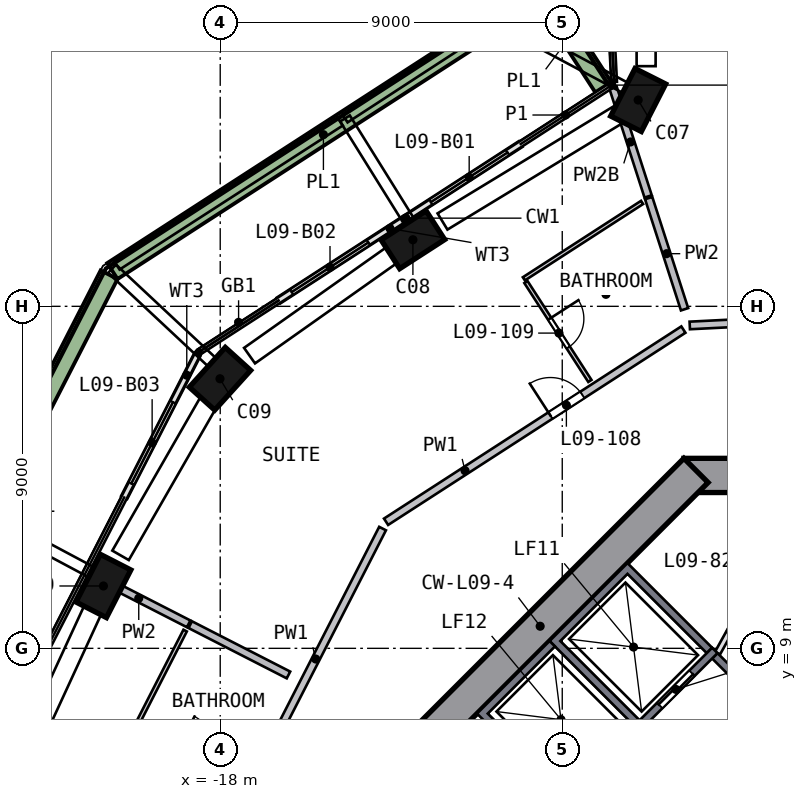
"""IFC4 building model, lengths in metres.
Left out: names, types, materials, properties, quantities, classifications, styles, units other than length and angle.
Written with IfcOpenShell. Run it as: python <this file> out.ifc"""

import sys

from ifc_helpers import new_model, si_unit, direction, frame, frame_2d, origin, origin_2d, place, context, subcontext, project, spatial, polyline, rectangle, outline, extrude, element, fill, save


model = new_model("IFC4")
c1 = context("Model", 3, precision=1e-05, world=origin(), true_north=direction((0.0, 1.0)))
c2 = subcontext(c1, "Body", "Model", "MODEL_VIEW")
j1 = project(units=[si_unit("LENGTHUNIT", "METRE"), si_unit("PLANEANGLEUNIT", "RADIAN")], contexts=[c1])
p1 = place(None, origin())
s1 = spatial("IfcSite", under=j1, at=p1, CompositionType="ELEMENT")
p2 = place(p1, origin())
s2 = spatial("IfcBuilding", under=s1, at=p2, CompositionType="ELEMENT")
p3 = place(p2, frame((0.0, 0.0, 46.0)))
s3 = spatial("IfcBuildingStorey", under=s2, at=p3, CompositionType="ELEMENT", Elevation=46.0)
p4 = place(p3, frame((-6.868, 23.469, 0.0), z_axis=(-0.111286879, -0.033598907, 0.993220189), x_axis=(0.448207197, 0.890312389, 0.080337778)))
e1 = element("IfcColumn", 1, at=p4, inside=s3, PredefinedType="COLUMN", context=c2, shape_type="SweptSolid", body=[
    extrude(rectangle(XDim=1.4, YDim=0.9, at=origin_2d()), origin(), (0.0, 0.0, 1.0), 3.212),
])
p5 = place(p3, frame((-12.816, 19.826, 0.0), z_axis=(-0.093845743, -0.061752629, 0.993669759), x_axis=(-0.83468518, -0.539148529, -0.112336608)))
e2 = element("IfcColumn", 2, at=p5, inside=s3, PredefinedType="COLUMN", context=c2, shape_type="SweptSolid", body=[
    extrude(rectangle(XDim=1.4, YDim=0.9, at=origin_2d()), origin(), (0.0, 0.0, 1.0), 3.21),
])
p6 = place(p3, frame((-17.914, 16.198, 0.0), z_axis=(-0.076332042, -0.085835533, 0.993380934), x_axis=(0.666408039, 0.736686462, 0.114862444)))
e3 = element("IfcColumn", 3, at=p6, inside=s3, PredefinedType="COLUMN", context=c2, shape_type="SweptSolid", body=[
    extrude(rectangle(XDim=1.4, YDim=0.9, at=origin_2d()), origin(), (0.0, 0.0, 1.0), 3.211),
])
p7 = place(p3, frame((-21.013, 10.762, 0.0), z_axis=(-0.050345335, -0.100386469, 0.993673943), x_axis=(-0.452981845, -0.884418594, -0.112299596)))
e4 = element("IfcColumn", 4, at=p7, inside=s3, PredefinedType="COLUMN", context=c2, shape_type="SweptSolid", body=[
    extrude(rectangle(XDim=1.4, YDim=0.9, at=origin_2d()), origin(), (0.0, 0.0, 1.0), 3.21),
])
p8 = place(p3, frame((5.799, 13.55, 0.0), z_axis=(0.0, 0.0, 1.0), x_axis=(-1.0, 0.0, 0.0)))
e5 = element("IfcWall", 5, at=p8, inside=s3, PredefinedType="SHEAR", context=c2, shape_type="SweptSolid", body=[
    extrude(rectangle(XDim=11.598, YDim=0.9, at=frame_2d((5.799, 0.0))), origin(), (0.0, 0.0, 1.0), 3.5),
])
p9 = place(p8, frame((4.899, 0.0, 0.0)))
e6 = element("IfcOpeningElement", 6, at=p9, cuts=e5, PredefinedType="OPENING", context=c2, shape_type="SweptSolid", body=[
    extrude(rectangle(XDim=1.8, YDim=2.1, at=frame_2d((0.9, 1.05))), frame((0.0, 0.46, 0.0), z_axis=(0.0, -1.0, 0.0), x_axis=(1.0, 0.0, 0.0)), (0.0, 0.0, 1.0), 0.92),
])
p10 = place(p3, frame((-5.481, 13.682, 0.0), z_axis=(0.0, 0.0, 1.0), x_axis=(-0.707106781, -0.707106781, 0.0)))
e7 = element("IfcWall", 7, at=p10, inside=s3, PredefinedType="SHEAR", context=c2, shape_type="SweptSolid", body=[
    extrude(rectangle(XDim=11.598, YDim=0.9, at=frame_2d((5.799, 0.0))), origin(), (0.0, 0.0, 1.0), 3.5),
])
p11 = place(p3, frame((-10.105, 22.264, 0.0), z_axis=(0.0, 0.0, 1.0), x_axis=(-0.83980298, -0.542891291, 0.0)))
e8 = element("IfcWall", 8, at=p11, inside=s3, PredefinedType="SOLIDWALL", context=c2, shape_type="SweptSolid", body=[
    extrude(rectangle(XDim=3.6, YDim=0.15, at=frame_2d((1.8, 0.0))), origin(), (0.0, 0.0, 1.0), 2.425),
])
p12 = place(p11, frame((0.4, 0.0, 0.0)))
e9 = element("IfcOpeningElement", 9, at=p12, cuts=e8, PredefinedType="OPENING", context=c2, shape_type="SweptSolid", body=[
    extrude(rectangle(XDim=2.4, YDim=2.4, at=frame_2d((1.2, 1.2))), frame((0.0, 0.085, 0.0), z_axis=(0.0, -1.0, 0.0), x_axis=(1.0, 0.0, 0.0)), (0.0, 0.0, 1.0), 0.17),
])
p13 = place(p3, frame((-13.129, 20.309, 0.0), z_axis=(0.0, 0.0, 1.0), x_axis=(-0.839837981, -0.542837145, 0.0)))
e10 = element("IfcWall", 10, at=p13, inside=s3, PredefinedType="SOLIDWALL", context=c2, shape_type="SweptSolid", body=[
    extrude(rectangle(XDim=3.96, YDim=0.15, at=frame_2d((1.98, 0.0))), origin(), (0.0, 0.0, 1.0), 2.425),
])
p14 = place(p13, frame((1.16, 0.0, 0.0)))
e11 = element("IfcOpeningElement", 11, at=p14, cuts=e10, PredefinedType="OPENING", context=c2, shape_type="SweptSolid", body=[
    extrude(rectangle(XDim=2.4, YDim=2.4, at=frame_2d((1.2, 1.2))), frame((0.0, 0.085, 0.0), z_axis=(0.0, -1.0, 0.0), x_axis=(1.0, 0.0, 0.0)), (0.0, 0.0, 1.0), 0.17),
])
p15 = place(p3, frame((-18.607, 16.72, 0.0), z_axis=(0.0, 0.0, 1.0), x_axis=(-0.455821941, -0.890070985, 0.0)))
e12 = element("IfcWall", 12, at=p15, inside=s3, PredefinedType="SOLIDWALL", context=c2, shape_type="SweptSolid", body=[
    extrude(rectangle(XDim=4.199, YDim=0.15, at=frame_2d((2.099, 0.0))), origin(), (0.0, 0.0, 1.0), 2.425),
])
p16 = place(p15, frame((1.399, 0.0, 0.0)))
e13 = element("IfcOpeningElement", 13, at=p16, cuts=e12, PredefinedType="OPENING", context=c2, shape_type="SweptSolid", body=[
    extrude(rectangle(XDim=2.4, YDim=2.4, at=frame_2d((1.2, 1.2))), frame((0.0, 0.085, 0.0), z_axis=(0.0, -1.0, 0.0), x_axis=(1.0, 0.0, 0.0)), (0.0, 0.0, 1.0), 0.17),
])
p17 = place(p3, frame((-7.921, 23.766, 0.0), z_axis=(0.0, 0.0, 1.0), x_axis=(-0.542827196, 0.839844411, 0.0)))
e14 = element("IfcWall", 14, at=p17, inside=s3, PredefinedType="SOLIDWALL", context=c2, shape_type="SweptSolid", body=[
    extrude(rectangle(XDim=3.199, YDim=0.5, at=frame_2d((1.6, 0.0))), origin(), (0.0, 0.0, 1.0), 0.7),
])
p18 = place(p3, frame((-9.732, 26.107, 0.0), z_axis=(0.0, 0.0, 1.0), x_axis=(-0.839803878, -0.542889903, 0.0)))
e15 = element("IfcWall", 15, at=p18, inside=s3, PredefinedType="SOLIDWALL", context=c2, shape_type="SweptSolid", body=[
    extrude(rectangle(XDim=13.224, YDim=0.5, at=frame_2d((6.612, 0.0))), origin(), (0.0, 0.0, 1.0), 0.7),
])
p19 = place(p3, frame((-20.924, 18.832, 0.0), z_axis=(0.0, 0.0, 1.0), x_axis=(-0.45585284, -0.89005516, 0.0)))
e16 = element("IfcWall", 16, at=p19, inside=s3, PredefinedType="SOLIDWALL", context=c2, shape_type="SweptSolid", body=[
    extrude(rectangle(XDim=13.723, YDim=0.5, at=frame_2d((6.862, 0.0))), origin(), (0.0, 0.0, 1.0), 0.7),
])
p20 = place(p3, origin())
e17 = element("IfcWall", 17, at=p20, inside=s3, PredefinedType="SOLIDWALL", context=c2, shape_type="SweptSolid", body=[
    extrude(outline(polyline([(-9.334, 9.192), (-7.283, 11.243), (-5.056, 9.016), (-5.197, 8.874), (-7.283, 10.96), (-9.051, 9.192), (-6.965, 7.106), (-7.106, 6.965), (-9.334, 9.192)])), origin(), (0.0, 0.0, 1.0), 3.19),
])
p21 = place(p3, frame((-4.985, 8.945, 0.0), z_axis=(0.0, 0.0, 1.0), x_axis=(-0.707106781, -0.707106781, 0.0)))
e18 = element("IfcWall", 18, at=p21, inside=s3, PredefinedType="SOLIDWALL", context=c2, shape_type="SweptSolid", body=[
    extrude(rectangle(XDim=2.9, YDim=0.2, at=frame_2d((1.45, 0.0))), origin(), (0.0, 0.0, 1.0), 3.19),
])
p22 = place(p21, frame((0.85, 0.0, 0.0)))
e19 = element("IfcOpeningElement", 19, at=p22, cuts=e18, PredefinedType="OPENING", context=c2, shape_type="SweptSolid", body=[
    extrude(rectangle(XDim=1.2, YDim=2.1, at=frame_2d((0.6, 1.05))), frame((0.0, 0.11, 0.0), z_axis=(0.0, -1.0, 0.0), x_axis=(1.0, 0.0, 0.0)), (0.0, 0.0, 1.0), 0.22),
])
p23 = place(p3, origin())
e20 = element("IfcWall", 20, at=p23, inside=s3, PredefinedType="SOLIDWALL", context=c2, shape_type="SweptSolid", body=[
    extrude(outline(polyline([(-11.243, 7.283), (-9.334, 9.192), (-9.192, 9.051), (-10.96, 7.283), (-8.874, 5.197), (-9.016, 5.056), (-11.243, 7.283)])), origin(), (0.0, 0.0, 1.0), 3.19),
])
p24 = place(p3, frame((-3.005, 6.823, 0.0), z_axis=(0.0, 0.0, 1.0), x_axis=(-0.707106781, 0.707106781, 0.0)))
e21 = element("IfcWall", 21, at=p24, inside=s3, PredefinedType="SOLIDWALL", context=c2, shape_type="SweptSolid", body=[
    extrude(rectangle(XDim=2.8, YDim=0.2, at=frame_2d((1.4, 0.0))), origin(), (0.0, 0.0, 1.0), 3.19),
])
p25 = place(p3, frame((-3.9, 10.7, 0.0), z_axis=(0.0, 0.0, 1.0), x_axis=(-0.485692555, -0.874129705, 0.0)))
e22 = element("IfcWall", 22, at=p25, inside=s3, PredefinedType="PARTITIONING", context=c2, shape_type="SweptSolid", body=[
    extrude(rectangle(XDim=2.089, YDim=0.15, at=frame_2d((1.044, 0.0))), origin(), (0.0, 0.0, 1.0), 3.19),
])
p26 = place(p25, frame((0.594, 0.0, 0.0)))
e23 = element("IfcOpeningElement", 23, at=p26, cuts=e22, PredefinedType="OPENING", context=c2, shape_type="SweptSolid", body=[
    extrude(rectangle(XDim=0.9, YDim=2.1, at=frame_2d((0.45, 1.05))), frame((0.0, 0.085, 0.0), z_axis=(0.0, -1.0, 0.0), x_axis=(1.0, 0.0, 0.0)), (0.0, 0.0, 1.0), 0.17),
])
p27 = place(p3, frame((-17.884, 4.039, 0.0), z_axis=(0.0, 0.0, 1.0), x_axis=(0.45584896, 0.890057147, 0.0)))
e24 = element("IfcWall", 24, at=p27, inside=s3, PredefinedType="SOLIDWALL", context=c2, shape_type="SweptSolid", body=[
    extrude(rectangle(XDim=9.115, YDim=0.2, at=frame_2d((4.558, 0.0))), origin(), (0.0, 0.0, 1.0), 3.19),
])
p28 = place(p27, frame((0.2, 0.0, 0.0)))
e25 = element("IfcOpeningElement", 25, at=p28, cuts=e24, PredefinedType="OPENING", context=c2, shape_type="SweptSolid", body=[
    extrude(rectangle(XDim=1.0, YDim=2.1, at=frame_2d((0.5, 1.05))), frame((0.0, 0.11, 0.0), z_axis=(0.0, -1.0, 0.0), x_axis=(1.0, 0.0, 0.0)), (0.0, 0.0, 1.0), 0.22),
])
p29 = place(p3, frame((-13.636, 12.331, 0.0), z_axis=(0.0, 0.0, 1.0), x_axis=(0.83981686, 0.54286982, 0.0)))
e26 = element("IfcWall", 26, at=p29, inside=s3, PredefinedType="SOLIDWALL", context=c2, shape_type="SweptSolid", body=[
    extrude(rectangle(XDim=9.316, YDim=0.2, at=frame_2d((4.658, 0.0))), origin(), (0.0, 0.0, 1.0), 3.19),
])
p30 = place(p29, frame((5.15, 0.0, 0.0)))
e27 = element("IfcOpeningElement", 27, at=p30, cuts=e26, PredefinedType="OPENING", context=c2, shape_type="SweptSolid", body=[
    extrude(rectangle(XDim=1.0, YDim=2.1, at=frame_2d((0.5, 1.05))), frame((0.0, 0.11, 0.0), z_axis=(0.0, -1.0, 0.0), x_axis=(1.0, 0.0, 0.0)), (0.0, 0.0, 1.0), 0.22),
])
p31 = place(p3, frame((-2.191, 17.671, 0.0), z_axis=(0.0, 0.0, 1.0), x_axis=(-0.998735912, -0.050265072, 0.0)))
e28 = element("IfcWall", 28, at=p31, inside=s3, PredefinedType="SOLIDWALL", context=c2, shape_type="SweptSolid", body=[
    extrude(rectangle(XDim=3.458, YDim=0.2, at=frame_2d((1.729, 0.0))), origin(), (0.0, 0.0, 1.0), 3.19),
])
p32 = place(p3, frame((-18.83, 9.644, 0.0), z_axis=(0.0, 0.0, 1.0), x_axis=(-0.890051549, 0.45585989, 0.0)))
e29 = element("IfcWall", 29, at=p32, inside=s3, PredefinedType="SOLIDWALL", context=c2, shape_type="SweptSolid", body=[
    extrude(rectangle(XDim=2.952, YDim=0.2, at=frame_2d((1.476, 0.0))), origin(), (0.0, 0.0, 1.0), 3.19),
])
p33 = place(p3, frame((-16.204, 8.299, 0.0), z_axis=(0.0, 0.0, 1.0), x_axis=(-0.890030887, 0.45590023, 0.0)))
e30 = element("IfcWall", 30, at=p33, inside=s3, PredefinedType="SOLIDWALL", context=c2, shape_type="SweptSolid", body=[
    extrude(rectangle(XDim=2.905, YDim=0.2, at=frame_2d((1.452, 0.0))), origin(), (0.0, 0.0, 1.0), 3.19),
])
p34 = place(p3, frame((-6.74, 20.892, 0.0), z_axis=(0.0, 0.0, 1.0), x_axis=(-0.307019361, 0.951703269, 0.0)))
e31 = element("IfcWall", 31, at=p34, inside=s3, PredefinedType="SOLIDWALL", context=c2, shape_type="SweptSolid", body=[
    extrude(rectangle(XDim=3.011, YDim=0.2, at=frame_2d((1.506, 0.0))), origin(), (0.0, 0.0, 1.0), 2.69),
])
p35 = place(p3, frame((-5.782, 17.923, 0.0), z_axis=(0.0, 0.0, 1.0), x_axis=(-0.306993499, 0.951711611, 0.0)))
e32 = element("IfcWall", 32, at=p35, inside=s3, PredefinedType="SOLIDWALL", context=c2, shape_type="SweptSolid", body=[
    extrude(rectangle(XDim=3.074, YDim=0.2, at=frame_2d((1.537, 0.0))), origin(), (0.0, 0.0, 1.0), 3.19),
])
p36 = place(p3, frame((-20.154, 7.064, 0.0), z_axis=(0.0, 0.0, 1.0), x_axis=(0.455909064, 0.890026362, 0.0)))
e33 = element("IfcWall", 33, at=p36, inside=s3, PredefinedType="PARTITIONING", context=c2, shape_type="SweptSolid", body=[
    extrude(rectangle(XDim=2.7, YDim=0.1, at=frame_2d((1.35, 0.0))), origin(), (0.0, 0.0, 1.0), 3.19),
])
p37 = place(p3, frame((-9.956, 18.639, 0.0), z_axis=(0.0, 0.0, 1.0), x_axis=(0.542885478, -0.839806739, 0.0)))
e34 = element("IfcWall", 34, at=p37, inside=s3, PredefinedType="PARTITIONING", context=c2, shape_type="SweptSolid", body=[
    extrude(rectangle(XDim=3.1, YDim=0.1, at=frame_2d((1.55, 0.0))), origin(), (0.0, 0.0, 1.0), 3.19),
])
p38 = place(p37, frame((1.15, 0.0, 0.0)))
e35 = element("IfcOpeningElement", 35, at=p38, cuts=e34, PredefinedType="OPENING", context=c2, shape_type="SweptSolid", body=[
    extrude(rectangle(XDim=0.9, YDim=2.1, at=frame_2d((0.45, 1.05))), frame((0.0, 0.06, 0.0), z_axis=(0.0, -1.0, 0.0), x_axis=(1.0, 0.0, 0.0)), (0.0, 0.0, 1.0), 0.12),
])
p39 = place(p3, frame((-10.01, 18.723, 0.0), z_axis=(0.0, 0.0, 1.0), x_axis=(0.839785832, 0.542917817, 0.0)))
e36 = element("IfcWall", 36, at=p39, inside=s3, PredefinedType="PARTITIONING", context=c2, shape_type="SweptSolid", body=[
    extrude(rectangle(XDim=3.704, YDim=0.1, at=frame_2d((1.852, 0.0))), origin(), (0.0, 0.0, 1.0), 3.19),
])
p40 = place(p12, origin())
e37 = element("IfcDoor", 37, at=p40, inside=s3, OperationType="SLIDING_TO_RIGHT", PredefinedType="DOOR", context=c2, shape_type="SweptSolid", body=[
    extrude(rectangle(XDim=2.4, YDim=2.4, at=frame_2d((1.2, 1.2))), frame((0.0, 0.025, 0.0), z_axis=(0.0, -1.0, 0.0), x_axis=(1.0, 0.0, 0.0)), (0.0, 0.0, 1.0), 0.05),
])
fill(e9, e37)
p41 = place(p14, origin())
e38 = element("IfcDoor", 38, at=p41, inside=s3, OperationType="SLIDING_TO_LEFT", PredefinedType="DOOR", context=c2, shape_type="SweptSolid", body=[
    extrude(rectangle(XDim=2.4, YDim=2.4, at=frame_2d((1.2, 1.2))), frame((0.0, 0.025, 0.0), z_axis=(0.0, -1.0, 0.0), x_axis=(1.0, 0.0, 0.0)), (0.0, 0.0, 1.0), 0.05),
])
fill(e11, e38)
p42 = place(p16, origin())
e39 = element("IfcDoor", 39, at=p42, inside=s3, OperationType="SLIDING_TO_LEFT", PredefinedType="DOOR", context=c2, shape_type="SweptSolid", body=[
    extrude(rectangle(XDim=2.4, YDim=2.4, at=frame_2d((1.2, 1.2))), frame((0.0, 0.025, 0.0), z_axis=(0.0, -1.0, 0.0), x_axis=(1.0, 0.0, 0.0)), (0.0, 0.0, 1.0), 0.05),
])
fill(e13, e39)
p43 = place(p22, origin())
e40 = element("IfcDoor", 40, at=p43, inside=s3, OperationType="DOUBLE_DOOR_SLIDING", PredefinedType="DOOR", context=c2, shape_type="SweptSolid", body=[
    extrude(rectangle(XDim=1.2, YDim=2.1, at=frame_2d((0.6, 1.05))), frame((0.0, 0.025, 0.0), z_axis=(0.0, -1.0, 0.0), x_axis=(1.0, 0.0, 0.0)), (0.0, 0.0, 1.0), 0.05),
])
fill(e19, e40)
p44 = place(p26, origin())
e41 = element("IfcDoor", 41, at=p44, inside=s3, OperationType="SINGLE_SWING_LEFT", PredefinedType="DOOR", context=c2, shape_type="SweptSolid", body=[
    extrude(rectangle(XDim=0.9, YDim=2.1, at=frame_2d((0.45, 1.05))), frame((0.0, 0.025, 0.0), z_axis=(0.0, -1.0, 0.0), x_axis=(1.0, 0.0, 0.0)), (0.0, 0.0, 1.0), 0.05),
])
fill(e23, e41)
p45 = place(p30, origin())
e42 = element("IfcDoor", 42, at=p45, inside=s3, OperationType="SINGLE_SWING_LEFT", PredefinedType="DOOR", context=c2, shape_type="SweptSolid", body=[
    extrude(rectangle(XDim=1.0, YDim=2.1, at=frame_2d((0.5, 1.05))), frame((0.0, 0.025, 0.0), z_axis=(0.0, -1.0, 0.0), x_axis=(1.0, 0.0, 0.0)), (0.0, 0.0, 1.0), 0.05),
])
fill(e27, e42)
p46 = place(p38, origin())
e43 = element("IfcDoor", 43, at=p46, inside=s3, OperationType="SINGLE_SWING_LEFT", PredefinedType="DOOR", context=c2, shape_type="SweptSolid", body=[
    extrude(rectangle(XDim=0.9, YDim=2.1, at=frame_2d((0.45, 1.05))), frame((0.0, 0.025, 0.0), z_axis=(0.0, -1.0, 0.0), x_axis=(1.0, 0.0, 0.0)), (0.0, 0.0, 1.0), 0.05),
])
fill(e35, e43)
save(model, sys.argv[1])
